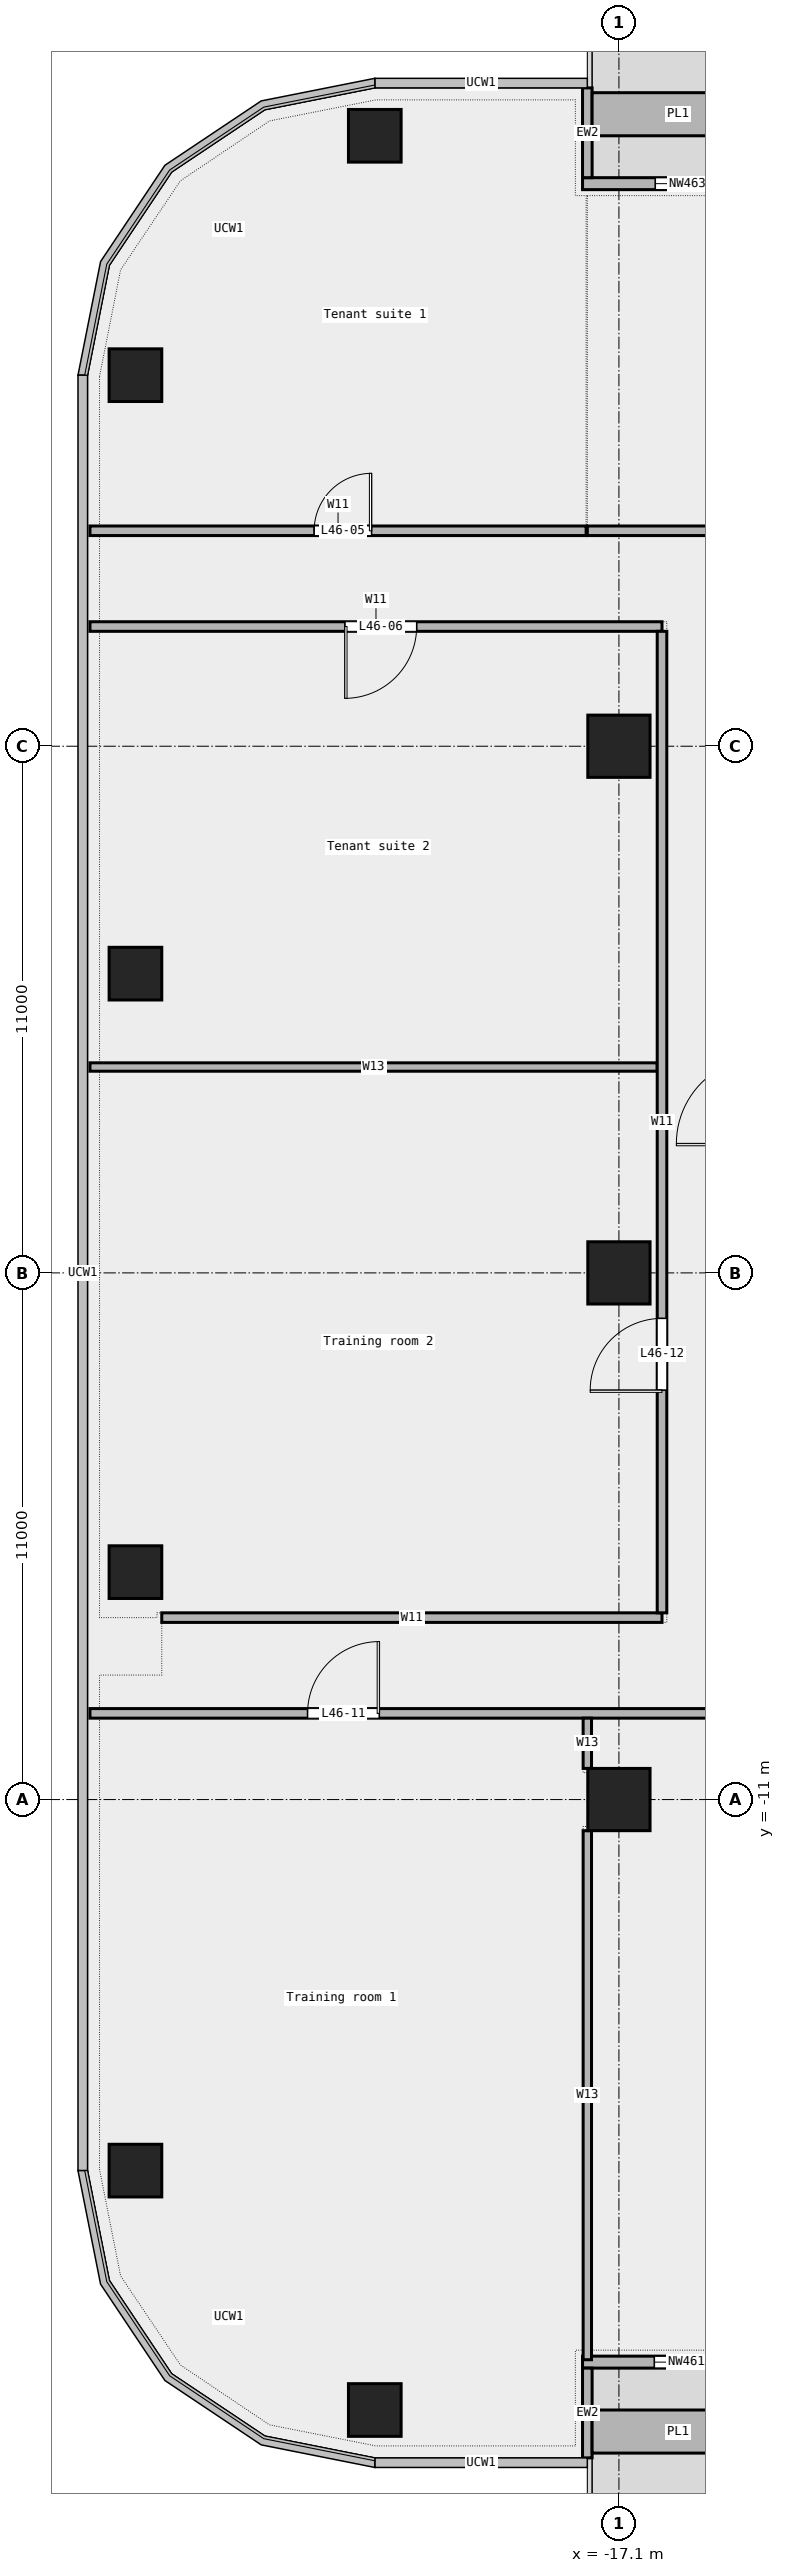
"""IFC4 building model, lengths in metres.
Left out: names, types, materials, properties, quantities, classifications, styles, units other than length and angle.
Written with IfcOpenShell. Run it as: python <this file> out.ifc"""

import sys

from ifc_helpers import new_model, si_unit, direction, frame, frame_2d, origin, origin_2d, place, context, subcontext, project, spatial, rectangle, extrude, element, fill, save


model = new_model("IFC4")
c1 = context("Model", 3, precision=1e-05, world=origin(), true_north=direction((0.0, 1.0)))
c2 = subcontext(c1, "Body", "Model", "MODEL_VIEW")
j1 = project(units=[si_unit("LENGTHUNIT", "METRE"), si_unit("PLANEANGLEUNIT", "RADIAN")], contexts=[c1])
p1 = place(None, origin())
s1 = spatial("IfcSite", under=j1, at=p1, CompositionType="ELEMENT")
p2 = place(p1, origin())
s2 = spatial("IfcBuilding", under=s1, at=p2, CompositionType="ELEMENT")
p3 = place(p2, frame((0.0, 0.0, 219.0)))
s3 = spatial("IfcBuildingStorey", under=s2, at=p3, CompositionType="ELEMENT", Elevation=219.0)
for number, where, z_axis, x_axis in (
    (1, (-22.2, -23.75, 0.0), (0.0, 0.0, 1.0), (1.0, 0.0, 0.0)),
    (2, (-22.2, 23.75, 0.0), (0.0, 0.0, 1.0), (1.0, 0.0, 0.0)),
    (3, (-27.2, 18.75, 0.0), (0.0, 0.0, 1.0), (1.0, 0.0, 0.0)),
    (4, (-27.2, 6.25, 0.0), (0.0, 0.0, 1.0), (1.0, 0.0, 0.0)),
    (5, (-27.2, -6.25, 0.0), (0.0, 0.0, 1.0), (1.0, 0.0, 0.0)),
    (6, (-27.2, -18.75, 0.0), (0.0, 0.0, 1.0), (1.0, 0.0, 0.0)),
):
    element("IfcColumn", number, at=place(p3, frame(where, z_axis=z_axis, x_axis=x_axis)), inside=s3, PredefinedType="COLUMN", context=c2, shape_type="SweptSolid", body=[
        extrude(rectangle(XDim=1.1, YDim=1.1, at=origin_2d()), origin(), (0.0, 0.0, 1.0), 3.6),
    ])
for number, where, z_axis, x_axis in (
    (7, (-17.1, -11.0, 0.0), (0.0, 0.0, 1.0), (1.0, 0.0, 0.0)),
    (8, (-17.1, 0.0, 0.0), (0.0, 0.0, 1.0), (1.0, 0.0, 0.0)),
    (9, (-17.1, 11.0, 0.0), (0.0, 0.0, 1.0), (1.0, 0.0, 0.0)),
):
    element("IfcColumn", number, at=place(p3, frame(where, z_axis=z_axis, x_axis=x_axis)), inside=s3, PredefinedType="COLUMN", context=c2, shape_type="SweptSolid", body=[
        extrude(rectangle(XDim=1.3, YDim=1.3, at=origin_2d()), origin(), (0.0, 0.0, 1.0), 3.6),
    ])
p4 = place(p3, frame((-17.86, -22.75, 0.0), z_axis=(0.0, 0.0, 1.0), x_axis=(1.0, 0.0, 0.0)))
e10 = element("IfcWall", 10, at=p4, inside=s3, PredefinedType="STANDARD", context=c2, shape_type="SweptSolid", body=[
    extrude(rectangle(XDim=13.52, YDim=0.25, at=frame_2d((6.76, 0.0))), origin(), (0.0, 0.0, 1.0), 3.6),
])
p5 = place(p4, frame((1.5, 0.0, 0.45)))
e11 = element("IfcOpeningElement", 11, at=p5, cuts=e10, PredefinedType="OPENING", context=c2, shape_type="SweptSolid", body=[
    extrude(rectangle(XDim=1.5, YDim=2.4, at=frame_2d((0.75, 1.2))), frame((0.0, 0.137, 0.0), z_axis=(0.0, -1.0, 0.0), x_axis=(1.0, 0.0, 0.0)), (0.0, 0.0, 1.0), 0.274),
])
p6 = place(p4, frame((4.0, 0.0, 0.0)))
e12 = element("IfcOpeningElement", 12, at=p6, cuts=e10, PredefinedType="OPENING", context=c2, shape_type="SweptSolid", body=[
    extrude(rectangle(XDim=1.8, YDim=2.4, at=frame_2d((0.9, 1.2))), frame((0.0, 0.137, 0.0), z_axis=(0.0, -1.0, 0.0), x_axis=(1.0, 0.0, 0.0)), (0.0, 0.0, 1.0), 0.274),
])
p7 = place(p4, frame((10.5, 0.0, 0.45)))
e13 = element("IfcOpeningElement", 13, at=p7, cuts=e10, PredefinedType="OPENING", context=c2, shape_type="SweptSolid", body=[
    extrude(rectangle(XDim=1.5, YDim=2.4, at=frame_2d((0.75, 1.2))), frame((0.0, 0.137, 0.0), z_axis=(0.0, -1.0, 0.0), x_axis=(1.0, 0.0, 0.0)), (0.0, 0.0, 1.0), 0.274),
])
p8 = place(p3, frame((-17.76, -24.75, 0.0), z_axis=(0.0, 0.0, 1.0), x_axis=(0.0, 1.0, 0.0)))
e14 = element("IfcWall", 14, at=p8, inside=s3, PredefinedType="STANDARD", context=c2, shape_type="SweptSolid", body=[
    extrude(rectangle(XDim=1.875, YDim=0.2, at=frame_2d((0.938, 0.0))), origin(), (0.0, 0.0, 1.0), 3.6),
])
p9 = place(p3, frame((-17.66, -24.2, 0.0), z_axis=(0.0, 0.0, 1.0), x_axis=(1.0, 0.0, 0.0)))
e15 = element("IfcWall", 15, at=p9, inside=s3, PredefinedType="STANDARD", context=c2, shape_type="SweptSolid", body=[
    extrude(rectangle(XDim=3.6, YDim=0.9, at=frame_2d((1.8, 0.0))), origin(), (0.0, 0.0, 1.0), 0.7),
])
p10 = place(p3, frame((-4.34, 22.75, 0.0), z_axis=(0.0, 0.0, 1.0), x_axis=(-1.0, 0.0, 0.0)))
e16 = element("IfcWall", 16, at=p10, inside=s3, PredefinedType="STANDARD", context=c2, shape_type="SweptSolid", body=[
    extrude(rectangle(XDim=13.52, YDim=0.25, at=frame_2d((6.76, 0.0))), origin(), (0.0, 0.0, 1.0), 3.6),
])
p11 = place(p10, frame((1.5, 0.0, 0.45)))
e17 = element("IfcOpeningElement", 17, at=p11, cuts=e16, PredefinedType="OPENING", context=c2, shape_type="SweptSolid", body=[
    extrude(rectangle(XDim=1.5, YDim=2.4, at=frame_2d((0.75, 1.2))), frame((0.0, 0.137, 0.0), z_axis=(0.0, -1.0, 0.0), x_axis=(1.0, 0.0, 0.0)), (0.0, 0.0, 1.0), 0.274),
])
p12 = place(p10, frame((4.0, 0.0, 0.0)))
e18 = element("IfcOpeningElement", 18, at=p12, cuts=e16, PredefinedType="OPENING", context=c2, shape_type="SweptSolid", body=[
    extrude(rectangle(XDim=1.8, YDim=2.4, at=frame_2d((0.9, 1.2))), frame((0.0, 0.137, 0.0), z_axis=(0.0, -1.0, 0.0), x_axis=(1.0, 0.0, 0.0)), (0.0, 0.0, 1.0), 0.274),
])
p13 = place(p10, frame((10.5, 0.0, 0.45)))
e19 = element("IfcOpeningElement", 19, at=p13, cuts=e16, PredefinedType="OPENING", context=c2, shape_type="SweptSolid", body=[
    extrude(rectangle(XDim=1.5, YDim=2.4, at=frame_2d((0.75, 1.2))), frame((0.0, 0.137, 0.0), z_axis=(0.0, -1.0, 0.0), x_axis=(1.0, 0.0, 0.0)), (0.0, 0.0, 1.0), 0.274),
])
p14 = place(p3, frame((-17.76, 24.75, 0.0), z_axis=(0.0, 0.0, 1.0), x_axis=(0.0, -1.0, 0.0)))
e20 = element("IfcWall", 20, at=p14, inside=s3, PredefinedType="STANDARD", context=c2, shape_type="SweptSolid", body=[
    extrude(rectangle(XDim=1.875, YDim=0.2, at=frame_2d((0.938, 0.0))), origin(), (0.0, 0.0, 1.0), 3.6),
])
p15 = place(p3, frame((-14.06, 24.2, 0.0), z_axis=(0.0, 0.0, 1.0), x_axis=(-1.0, 0.0, 0.0)))
e21 = element("IfcWall", 21, at=p15, inside=s3, PredefinedType="STANDARD", context=c2, shape_type="SweptSolid", body=[
    extrude(rectangle(XDim=3.6, YDim=0.9, at=frame_2d((1.8, 0.0))), origin(), (0.0, 0.0, 1.0), 0.7),
])
p16 = place(p3, frame((-28.15, -9.2, 0.0), z_axis=(0.0, 0.0, 1.0), x_axis=(1.0, 0.0, 0.0)))
e22 = element("IfcWall", 22, at=p16, inside=s3, PredefinedType="PARTITIONING", context=c2, shape_type="SweptSolid", body=[
    extrude(rectangle(XDim=54.3, YDim=0.2, at=frame_2d((27.15, 0.0))), origin(), (0.0, 0.0, 1.0), 3.6),
])
p17 = place(p16, frame((42.555, 0.0, 0.0)))
e23 = element("IfcOpeningElement", 23, at=p17, cuts=e22, PredefinedType="OPENING", context=c2, shape_type="SweptSolid", body=[
    extrude(rectangle(XDim=1.8, YDim=2.1, at=frame_2d((0.9, 1.05))), frame((0.0, 0.112, 0.0), z_axis=(0.0, -1.0, 0.0), x_axis=(1.0, 0.0, 0.0)), (0.0, 0.0, 1.0), 0.224),
])
p18 = place(p16, frame((27.51, 0.0, 0.0)))
e24 = element("IfcOpeningElement", 24, at=p18, cuts=e22, PredefinedType="OPENING", context=c2, shape_type="SweptSolid", body=[
    extrude(rectangle(XDim=1.5, YDim=2.1, at=frame_2d((0.75, 1.05))), frame((0.0, 0.112, 0.0), z_axis=(0.0, -1.0, 0.0), x_axis=(1.0, 0.0, 0.0)), (0.0, 0.0, 1.0), 0.224),
])
p19 = place(p16, frame((16.15, 0.0, 0.0)))
e25 = element("IfcOpeningElement", 25, at=p19, cuts=e22, PredefinedType="OPENING", context=c2, shape_type="SweptSolid", body=[
    extrude(rectangle(XDim=1.8, YDim=2.1, at=frame_2d((0.9, 1.05))), frame((0.0, 0.112, 0.0), z_axis=(0.0, -1.0, 0.0), x_axis=(1.0, 0.0, 0.0)), (0.0, 0.0, 1.0), 0.224),
])
p20 = place(p16, frame((4.545, 0.0, 0.0)))
e26 = element("IfcOpeningElement", 26, at=p20, cuts=e22, PredefinedType="OPENING", context=c2, shape_type="SweptSolid", body=[
    extrude(rectangle(XDim=1.5, YDim=2.1, at=frame_2d((0.75, 1.05))), frame((0.0, 0.112, 0.0), z_axis=(0.0, -1.0, 0.0), x_axis=(1.0, 0.0, 0.0)), (0.0, 0.0, 1.0), 0.224),
])
p21 = place(p3, frame((-26.65, -7.2, 0.0), z_axis=(0.0, 0.0, 1.0), x_axis=(1.0, 0.0, 0.0)))
e27 = element("IfcWall", 27, at=p21, inside=s3, PredefinedType="PARTITIONING", context=c2, shape_type="SweptSolid", body=[
    extrude(rectangle(XDim=10.45, YDim=0.2, at=frame_2d((5.225, 0.0))), origin(), (0.0, 0.0, 1.0), 3.6),
])
p22 = place(p3, frame((-28.15, 4.3, 0.0), z_axis=(0.0, 0.0, 1.0), x_axis=(1.0, 0.0, 0.0)))
e28 = element("IfcWall", 28, at=p22, inside=s3, PredefinedType="PARTITIONING", context=c2, shape_type="SweptSolid", body=[
    extrude(rectangle(XDim=11.85, YDim=0.175, at=frame_2d((5.925, 0.0))), origin(), (0.0, 0.0, 1.0), 3.6),
])
p23 = place(p3, frame((-28.15, 13.5, 0.0), z_axis=(0.0, 0.0, 1.0), x_axis=(1.0, 0.0, 0.0)))
e29 = element("IfcWall", 29, at=p23, inside=s3, PredefinedType="PARTITIONING", context=c2, shape_type="SweptSolid", body=[
    extrude(rectangle(XDim=11.95, YDim=0.2, at=frame_2d((5.975, 0.0))), origin(), (0.0, 0.0, 1.0), 3.6),
])
p24 = place(p23, frame((5.325, 0.0, 0.0)))
e30 = element("IfcOpeningElement", 30, at=p24, cuts=e29, PredefinedType="OPENING", context=c2, shape_type="SweptSolid", body=[
    extrude(rectangle(XDim=1.5, YDim=2.1, at=frame_2d((0.75, 1.05))), frame((0.0, 0.112, 0.0), z_axis=(0.0, -1.0, 0.0), x_axis=(1.0, 0.0, 0.0)), (0.0, 0.0, 1.0), 0.224),
])
p25 = place(p3, frame((-28.15, 15.5, 0.0), z_axis=(0.0, 0.0, 1.0), x_axis=(1.0, 0.0, 0.0)))
e31 = element("IfcWall", 31, at=p25, inside=s3, PredefinedType="PARTITIONING", context=c2, shape_type="SweptSolid", body=[
    extrude(rectangle(XDim=10.365, YDim=0.2, at=frame_2d((5.183, 0.0))), origin(), (0.0, 0.0, 1.0), 3.6),
])
p26 = place(p25, frame((4.683, 0.0, 0.0)))
e32 = element("IfcOpeningElement", 32, at=p26, cuts=e31, PredefinedType="OPENING", context=c2, shape_type="SweptSolid", body=[
    extrude(rectangle(XDim=1.2, YDim=2.1, at=frame_2d((0.6, 1.05))), frame((0.0, 0.112, 0.0), z_axis=(0.0, -1.0, 0.0), x_axis=(1.0, 0.0, 0.0)), (0.0, 0.0, 1.0), 0.224),
])
p27 = place(p3, frame((-17.76, 15.5, 0.0), z_axis=(0.0, 0.0, 1.0), x_axis=(1.0, 0.0, 0.0)))
e33 = element("IfcWall", 33, at=p27, inside=s3, PredefinedType="PARTITIONING", context=c2, shape_type="SweptSolid", body=[
    extrude(rectangle(XDim=45.91, YDim=0.2, at=frame_2d((22.955, 0.0))), origin(), (0.0, 0.0, 1.0), 3.6),
])
p28 = place(p27, frame((37.337, 0.0, 0.0)))
e34 = element("IfcOpeningElement", 34, at=p28, cuts=e33, PredefinedType="OPENING", context=c2, shape_type="SweptSolid", body=[
    extrude(rectangle(XDim=1.5, YDim=2.1, at=frame_2d((0.75, 1.05))), frame((0.0, 0.112, 0.0), z_axis=(0.0, -1.0, 0.0), x_axis=(1.0, 0.0, 0.0)), (0.0, 0.0, 1.0), 0.224),
])
p29 = place(p27, frame((24.633, 0.0, 0.0)))
e35 = element("IfcOpeningElement", 35, at=p29, cuts=e33, PredefinedType="OPENING", context=c2, shape_type="SweptSolid", body=[
    extrude(rectangle(XDim=1.5, YDim=2.1, at=frame_2d((0.75, 1.05))), frame((0.0, 0.112, 0.0), z_axis=(0.0, -1.0, 0.0), x_axis=(1.0, 0.0, 0.0)), (0.0, 0.0, 1.0), 0.224),
])
p30 = place(p27, frame((5.91, 0.0, 0.0)))
e36 = element("IfcOpeningElement", 36, at=p30, cuts=e33, PredefinedType="OPENING", context=c2, shape_type="SweptSolid", body=[
    extrude(rectangle(XDim=1.5, YDim=2.1, at=frame_2d((0.75, 1.05))), frame((0.0, 0.112, 0.0), z_axis=(0.0, -1.0, 0.0), x_axis=(1.0, 0.0, 0.0)), (0.0, 0.0, 1.0), 0.224),
])
p31 = place(p27, frame((16.21, 0.0, 0.0)))
e37 = element("IfcOpeningElement", 37, at=p31, cuts=e33, PredefinedType="OPENING", context=c2, shape_type="SweptSolid", body=[
    extrude(rectangle(XDim=1.2, YDim=2.1, at=frame_2d((0.6, 1.05))), frame((0.0, 0.112, 0.0), z_axis=(0.0, -1.0, 0.0), x_axis=(1.0, 0.0, 0.0)), (0.0, 0.0, 1.0), 0.224),
])
p32 = place(p3, frame((-17.76, -22.7, 0.0), z_axis=(0.0, 0.0, 1.0), x_axis=(0.0, 1.0, 0.0)))
e38 = element("IfcWall", 38, at=p32, inside=s3, PredefinedType="PARTITIONING", context=c2, shape_type="SweptSolid", body=[
    extrude(rectangle(XDim=11.05, YDim=0.175, at=frame_2d((5.525, 0.0))), origin(), (0.0, 0.0, 1.0), 3.6),
])
p33 = place(p3, frame((-17.76, -10.35, 0.0), z_axis=(0.0, 0.0, 1.0), x_axis=(0.0, 1.0, 0.0)))
e39 = element("IfcWall", 39, at=p33, inside=s3, PredefinedType="PARTITIONING", context=c2, shape_type="SweptSolid", body=[
    extrude(rectangle(XDim=1.05, YDim=0.175, at=frame_2d((0.525, 0.0))), origin(), (0.0, 0.0, 1.0), 3.6),
])
p34 = place(p3, frame((-16.2, -7.1, 0.0), z_axis=(0.0, 0.0, 1.0), x_axis=(0.0, 1.0, 0.0)))
e40 = element("IfcWall", 40, at=p34, inside=s3, PredefinedType="PARTITIONING", context=c2, shape_type="SweptSolid", body=[
    extrude(rectangle(XDim=20.5, YDim=0.2, at=frame_2d((10.25, 0.0))), origin(), (0.0, 0.0, 1.0), 3.6),
])
p35 = place(p34, frame((4.65, 0.0, 0.0)))
e41 = element("IfcOpeningElement", 41, at=p35, cuts=e40, PredefinedType="OPENING", context=c2, shape_type="SweptSolid", body=[
    extrude(rectangle(XDim=1.5, YDim=2.1, at=frame_2d((0.75, 1.05))), frame((0.0, 0.112, 0.0), z_axis=(0.0, -1.0, 0.0), x_axis=(1.0, 0.0, 0.0)), (0.0, 0.0, 1.0), 0.224),
])
p36 = place(p5, origin())
e42 = element("IfcWindow", 42, at=p36, inside=s3, PartitioningType="SINGLE_PANEL", PredefinedType="WINDOW", context=c2, shape_type="SweptSolid", body=[
    extrude(rectangle(XDim=1.5, YDim=2.4, at=frame_2d((0.75, 1.2))), frame((0.0, 0.03, 0.0), z_axis=(0.0, -1.0, 0.0), x_axis=(1.0, 0.0, 0.0)), (0.0, 0.0, 1.0), 0.06),
])
fill(e11, e42)
p37 = place(p13, origin())
e43 = element("IfcWindow", 43, at=p37, inside=s3, PartitioningType="SINGLE_PANEL", PredefinedType="WINDOW", context=c2, shape_type="SweptSolid", body=[
    extrude(rectangle(XDim=1.5, YDim=2.4, at=frame_2d((0.75, 1.2))), frame((0.0, 0.03, 0.0), z_axis=(0.0, -1.0, 0.0), x_axis=(1.0, 0.0, 0.0)), (0.0, 0.0, 1.0), 0.06),
])
fill(e19, e43)
p38 = place(p26, origin())
e44 = element("IfcDoor", 44, at=p38, inside=s3, OperationType="SINGLE_SWING_RIGHT", PredefinedType="DOOR", context=c2, shape_type="SweptSolid", body=[
    extrude(rectangle(XDim=1.2, YDim=2.1, at=frame_2d((0.6, 1.05))), frame((0.0, 0.025, 0.0), z_axis=(0.0, -1.0, 0.0), x_axis=(1.0, 0.0, 0.0)), (0.0, 0.0, 1.0), 0.05),
])
fill(e32, e44)
p39 = place(p24, origin())
e45 = element("IfcDoor", 45, at=p39, inside=s3, OperationType="DOUBLE_DOOR_SINGLE_SWING", PredefinedType="DOOR", context=c2, shape_type="SweptSolid", body=[
    extrude(rectangle(XDim=1.5, YDim=2.1, at=frame_2d((0.75, 1.05))), frame((0.0, 0.025, 0.0), z_axis=(0.0, -1.0, 0.0), x_axis=(1.0, 0.0, 0.0)), (0.0, 0.0, 1.0), 0.05),
])
fill(e30, e45)
p40 = place(p20, origin())
e46 = element("IfcDoor", 46, at=p40, inside=s3, OperationType="DOUBLE_DOOR_SINGLE_SWING", PredefinedType="DOOR", context=c2, shape_type="SweptSolid", body=[
    extrude(rectangle(XDim=1.5, YDim=2.1, at=frame_2d((0.75, 1.05))), frame((0.0, 0.025, 0.0), z_axis=(0.0, -1.0, 0.0), x_axis=(1.0, 0.0, 0.0)), (0.0, 0.0, 1.0), 0.05),
])
fill(e26, e46)
p41 = place(p35, origin())
e47 = element("IfcDoor", 47, at=p41, inside=s3, OperationType="DOUBLE_DOOR_SINGLE_SWING", PredefinedType="DOOR", context=c2, shape_type="SweptSolid", body=[
    extrude(rectangle(XDim=1.5, YDim=2.1, at=frame_2d((0.75, 1.05))), frame((0.0, 0.025, 0.0), z_axis=(0.0, -1.0, 0.0), x_axis=(1.0, 0.0, 0.0)), (0.0, 0.0, 1.0), 0.05),
])
fill(e41, e47)
save(model, sys.argv[1])
